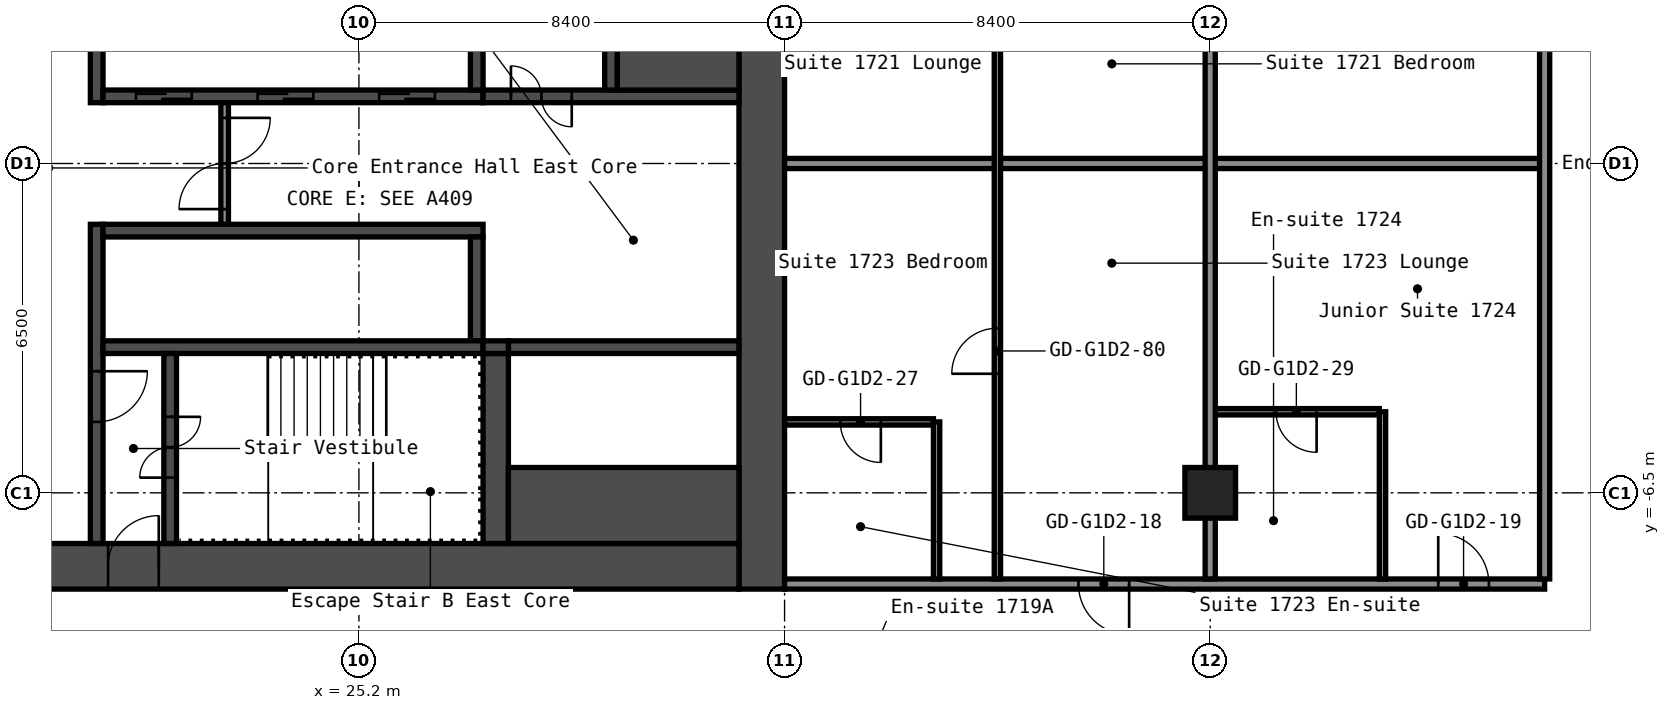
"""IFC4 building model, lengths in metres.
Left out: names, types, materials, properties, quantities, classifications, styles, units other than length and angle.
Written with IfcOpenShell. Run it as: python <this file> out.ifc"""

import sys

from ifc_helpers import new_model, si_unit, direction, frame, frame_2d, origin, origin_2d, place, context, subcontext, project, spatial, rectangle, hollow_rectangle, extrude, element, fill, save


model = new_model("IFC4")
c1 = context("Model", 3, precision=1e-05, world=origin(), true_north=direction((0.0, 1.0)))
c2 = subcontext(c1, "Body", "Model", "MODEL_VIEW")
j1 = project(units=[si_unit("LENGTHUNIT", "METRE"), si_unit("PLANEANGLEUNIT", "RADIAN")], contexts=[c1])
p1 = place(None, origin())
s1 = spatial("IfcSite", under=j1, at=p1, CompositionType="ELEMENT")
p2 = place(p1, origin())
s2 = spatial("IfcBuilding", under=s1, at=p2, CompositionType="ELEMENT")
p3 = place(p2, frame((0.0, 0.0, 61.4)))
s3 = spatial("IfcBuildingStorey", under=s2, at=p3, CompositionType="ELEMENT", Elevation=61.4)
p4 = place(p3, frame((42.0, -6.5, 0.0), z_axis=(0.0, 0.0, 1.0), x_axis=(1.0, 0.0, 0.0)))
e1 = element("IfcColumn", 1, at=p4, inside=s3, PredefinedType="COLUMN", context=c2, shape_type="SweptSolid", body=[
    extrude(hollow_rectangle(XDim=1.0, YDim=1.0, WallThickness=0.04, at=origin_2d()), origin(), (0.0, 0.0, 1.0), 2.9),
])
p5 = place(p3, frame((33.15, -8.4, 0.0), z_axis=(0.0, 0.0, 1.0), x_axis=(0.0, 1.0, 0.0)))
e2 = element("IfcWall", 2, at=p5, inside=s3, PredefinedType="SHEAR", context=c2, shape_type="SweptSolid", body=[
    extrude(rectangle(XDim=16.8, YDim=0.9, at=frame_2d((8.4, 0.0))), origin(), (0.0, 0.0, 1.0), 2.9),
])
p6 = place(p3, frame((17.7, -7.95, 0.0), z_axis=(0.0, 0.0, 1.0), x_axis=(1.0, 0.0, 0.0)))
e3 = element("IfcWall", 3, at=p6, inside=s3, PredefinedType="SHEAR", context=c2, shape_type="SweptSolid", body=[
    extrude(rectangle(XDim=15.0, YDim=0.9, at=frame_2d((7.5, 0.0))), origin(), (0.0, 0.0, 1.0), 2.9),
])
p7 = place(p6, frame((2.55, 0.0, 0.0)))
e4 = element("IfcOpeningElement", 4, at=p7, cuts=e3, PredefinedType="OPENING", context=c2, shape_type="SweptSolid", body=[
    extrude(rectangle(XDim=1.0, YDim=2.1, at=frame_2d((0.5, 1.05))), frame((0.0, 0.46, 0.0), z_axis=(0.0, -1.0, 0.0), x_axis=(1.0, 0.0, 0.0)), (0.0, 0.0, 1.0), 0.92),
])
p8 = place(p3, frame((20.025, 1.2, 0.0), z_axis=(0.0, 0.0, 1.0), x_axis=(0.0, 1.0, 0.0)))
e5 = element("IfcWall", 5, at=p8, inside=s3, PredefinedType="SHEAR", context=c2, shape_type="SweptSolid", body=[
    extrude(rectangle(XDim=6.3, YDim=0.25, at=frame_2d((3.15, 0.0))), origin(), (0.0, 0.0, 1.0), 2.9),
])
p9 = place(p3, frame((20.025, -7.5, 0.0), z_axis=(0.0, 0.0, 1.0), x_axis=(0.0, 1.0, 0.0)))
e6 = element("IfcWall", 6, at=p9, inside=s3, PredefinedType="SHEAR", context=c2, shape_type="SweptSolid", body=[
    extrude(rectangle(XDim=6.3, YDim=0.25, at=frame_2d((3.15, 0.0))), origin(), (0.0, 0.0, 1.0), 2.9),
])
p10 = place(p9, frame((2.4, 0.0, 0.0)))
e7 = element("IfcOpeningElement", 7, at=p10, cuts=e6, PredefinedType="OPENING", context=c2, shape_type="SweptSolid", body=[
    extrude(rectangle(XDim=1.0, YDim=2.1, at=frame_2d((0.5, 1.05))), frame((0.0, 0.135, 0.0), z_axis=(0.0, -1.0, 0.0), x_axis=(1.0, 0.0, 0.0)), (0.0, 0.0, 1.0), 0.27),
])
p11 = place(p3, frame((20.15, 1.325, 0.0), z_axis=(0.0, 0.0, 1.0), x_axis=(1.0, 0.0, 0.0)))
e8 = element("IfcWall", 8, at=p11, inside=s3, PredefinedType="SHEAR", context=c2, shape_type="SweptSolid", body=[
    extrude(rectangle(XDim=7.5, YDim=0.25, at=frame_2d((3.75, 0.0))), origin(), (0.0, 0.0, 1.0), 2.9),
])
p12 = place(p11, frame((0.65, 0.0, 0.0)))
e9 = element("IfcOpeningElement", 9, at=p12, cuts=e8, PredefinedType="OPENING", context=c2, shape_type="SweptSolid", body=[
    extrude(rectangle(XDim=1.1, YDim=2.1, at=frame_2d((0.55, 1.05))), frame((0.0, 0.135, 0.0), z_axis=(0.0, -1.0, 0.0), x_axis=(1.0, 0.0, 0.0)), (0.0, 0.0, 1.0), 0.27),
])
p13 = place(p11, frame((3.05, 0.0, 0.0)))
e10 = element("IfcOpeningElement", 10, at=p13, cuts=e8, PredefinedType="OPENING", context=c2, shape_type="SweptSolid", body=[
    extrude(rectangle(XDim=1.1, YDim=2.1, at=frame_2d((0.55, 1.05))), frame((0.0, 0.135, 0.0), z_axis=(0.0, -1.0, 0.0), x_axis=(1.0, 0.0, 0.0)), (0.0, 0.0, 1.0), 0.27),
])
p14 = place(p11, frame((5.45, 0.0, 0.0)))
e11 = element("IfcOpeningElement", 11, at=p14, cuts=e8, PredefinedType="OPENING", context=c2, shape_type="SweptSolid", body=[
    extrude(rectangle(XDim=1.1, YDim=2.1, at=frame_2d((0.55, 1.05))), frame((0.0, 0.135, 0.0), z_axis=(0.0, -1.0, 0.0), x_axis=(1.0, 0.0, 0.0)), (0.0, 0.0, 1.0), 0.27),
])
p15 = place(p3, frame((27.525, 1.45, 0.0), z_axis=(0.0, 0.0, 1.0), x_axis=(0.0, 1.0, 0.0)))
e12 = element("IfcWall", 12, at=p15, inside=s3, PredefinedType="SHEAR", context=c2, shape_type="SweptSolid", body=[
    extrude(rectangle(XDim=2.05, YDim=0.25, at=frame_2d((1.025, 0.0))), origin(), (0.0, 0.0, 1.0), 2.9),
])
p16 = place(p3, frame((27.65, 1.325, 0.0), z_axis=(0.0, 0.0, 1.0), x_axis=(1.0, 0.0, 0.0)))
e13 = element("IfcWall", 13, at=p16, inside=s3, PredefinedType="SHEAR", context=c2, shape_type="SweptSolid", body=[
    extrude(rectangle(XDim=5.05, YDim=0.25, at=frame_2d((2.525, 0.0))), origin(), (0.0, 0.0, 1.0), 2.9),
])
p17 = place(p16, frame((0.55, 0.0, 0.0)))
e14 = element("IfcOpeningElement", 14, at=p17, cuts=e13, PredefinedType="OPENING", context=c2, shape_type="SweptSolid", body=[
    extrude(rectangle(XDim=1.2, YDim=2.1, at=frame_2d((0.6, 1.05))), frame((0.0, 0.135, 0.0), z_axis=(0.0, -1.0, 0.0), x_axis=(1.0, 0.0, 0.0)), (0.0, 0.0, 1.0), 0.27),
])
p18 = place(p3, frame((30.175, 1.45, 0.0), z_axis=(0.0, 0.0, 1.0), x_axis=(0.0, 1.0, 0.0)))
e15 = element("IfcWall", 15, at=p18, inside=s3, PredefinedType="SHEAR", context=c2, shape_type="SweptSolid", body=[
    extrude(rectangle(XDim=6.05, YDim=0.25, at=frame_2d((3.025, 0.0))), origin(), (0.0, 0.0, 1.0), 2.9),
])
p19 = place(p18, frame((2.625, 0.0, 0.0)))
e16 = element("IfcOpeningElement", 16, at=p19, cuts=e15, PredefinedType="OPENING", context=c2, shape_type="SweptSolid", body=[
    extrude(rectangle(XDim=1.1, YDim=2.1, at=frame_2d((0.55, 1.05))), frame((0.0, 0.135, 0.0), z_axis=(0.0, -1.0, 0.0), x_axis=(1.0, 0.0, 0.0)), (0.0, 0.0, 1.0), 0.27),
])
p20 = place(p3, frame((30.3, 2.375, 0.0), z_axis=(0.0, 0.0, 1.0), x_axis=(1.0, 0.0, 0.0)))
e17 = element("IfcWall", 17, at=p20, inside=s3, PredefinedType="SHEAR", context=c2, shape_type="SweptSolid", body=[
    extrude(rectangle(XDim=2.4, YDim=1.85, at=frame_2d((1.2, 0.0))), origin(), (0.0, 0.0, 1.0), 2.9),
])
p21 = place(p3, frame((20.15, -1.325, 0.0), z_axis=(0.0, 0.0, 1.0), x_axis=(1.0, 0.0, 0.0)))
e18 = element("IfcWall", 18, at=p21, inside=s3, PredefinedType="SHEAR", context=c2, shape_type="SweptSolid", body=[
    extrude(rectangle(XDim=7.5, YDim=0.25, at=frame_2d((3.75, 0.0))), origin(), (0.0, 0.0, 1.0), 2.9),
])
p22 = place(p3, frame((27.525, -3.5, 0.0), z_axis=(0.0, 0.0, 1.0), x_axis=(0.0, 1.0, 0.0)))
e19 = element("IfcWall", 19, at=p22, inside=s3, PredefinedType="SHEAR", context=c2, shape_type="SweptSolid", body=[
    extrude(rectangle(XDim=2.05, YDim=0.25, at=frame_2d((1.025, 0.0))), origin(), (0.0, 0.0, 1.0), 2.9),
])
p23 = place(p3, frame((20.15, -3.625, 0.0), z_axis=(0.0, 0.0, 1.0), x_axis=(1.0, 0.0, 0.0)))
e20 = element("IfcWall", 20, at=p23, inside=s3, PredefinedType="SHEAR", context=c2, shape_type="SweptSolid", body=[
    extrude(rectangle(XDim=7.5, YDim=0.25, at=frame_2d((3.75, 0.0))), origin(), (0.0, 0.0, 1.0), 2.9),
])
p24 = place(p3, frame((21.475, -7.5, 0.0), z_axis=(0.0, 0.0, 1.0), x_axis=(0.0, 1.0, 0.0)))
e21 = element("IfcWall", 21, at=p24, inside=s3, PredefinedType="SHEAR", context=c2, shape_type="SweptSolid", body=[
    extrude(rectangle(XDim=3.75, YDim=0.25, at=frame_2d((1.875, 0.0))), origin(), (0.0, 0.0, 1.0), 2.9),
])
p25 = place(p24, frame((1.3, 0.0, 0.0)))
e22 = element("IfcOpeningElement", 22, at=p25, cuts=e21, PredefinedType="OPENING", context=c2, shape_type="SweptSolid", body=[
    extrude(rectangle(XDim=1.2, YDim=2.1, at=frame_2d((0.6, 1.05))), frame((0.0, 0.135, 0.0), z_axis=(0.0, -1.0, 0.0), x_axis=(1.0, 0.0, 0.0)), (0.0, 0.0, 1.0), 0.27),
])
p26 = place(p3, frame((27.9, -7.5, 0.0), z_axis=(0.0, 0.0, 1.0), x_axis=(0.0, 1.0, 0.0)))
e23 = element("IfcWall", 23, at=p26, inside=s3, PredefinedType="SHEAR", context=c2, shape_type="SweptSolid", body=[
    extrude(rectangle(XDim=3.75, YDim=0.5, at=frame_2d((1.875, 0.0))), origin(), (0.0, 0.0, 1.0), 2.9),
])
p27 = place(p3, frame((28.15, -3.625, 0.0), z_axis=(0.0, 0.0, 1.0), x_axis=(1.0, 0.0, 0.0)))
e24 = element("IfcWall", 24, at=p27, inside=s3, PredefinedType="SHEAR", context=c2, shape_type="SweptSolid", body=[
    extrude(rectangle(XDim=4.55, YDim=0.25, at=frame_2d((2.275, 0.0))), origin(), (0.0, 0.0, 1.0), 2.9),
])
p28 = place(p3, frame((28.15, -6.75, 0.0), z_axis=(0.0, 0.0, 1.0), x_axis=(1.0, 0.0, 0.0)))
e25 = element("IfcWall", 25, at=p28, inside=s3, PredefinedType="SHEAR", context=c2, shape_type="SweptSolid", body=[
    extrude(rectangle(XDim=4.55, YDim=1.5, at=frame_2d((2.275, 0.0))), origin(), (0.0, 0.0, 1.0), 2.9),
])
p29 = place(p3, frame((27.65, -3.625, 0.0), z_axis=(0.0, 0.0, 1.0), x_axis=(1.0, 0.0, 0.0)))
e26 = element("IfcWall", 26, at=p29, inside=s3, PredefinedType="SHEAR", context=c2, shape_type="SweptSolid", body=[
    extrude(rectangle(XDim=0.5, YDim=0.25, at=frame_2d((0.25, 0.0))), origin(), (0.0, 0.0, 1.0), 2.9),
])
p30 = place(p3, frame((22.55, -1.2, 0.0), z_axis=(0.0, 0.0, 1.0), x_axis=(0.0, 1.0, 0.0)))
e27 = element("IfcWall", 27, at=p30, inside=s3, PredefinedType="PARTITIONING", context=c2, shape_type="SweptSolid", body=[
    extrude(rectangle(XDim=2.4, YDim=0.15, at=frame_2d((1.2, 0.0))), origin(), (0.0, 0.0, 1.0), 2.9),
])
p31 = place(p30, frame((0.3, 0.0, 0.0)))
e28 = element("IfcOpeningElement", 28, at=p31, cuts=e27, PredefinedType="OPENING", context=c2, shape_type="SweptSolid", body=[
    extrude(rectangle(XDim=1.8, YDim=2.1, at=frame_2d((0.9, 1.05))), frame((0.0, 0.085, 0.0), z_axis=(0.0, -1.0, 0.0), x_axis=(1.0, 0.0, 0.0)), (0.0, 0.0, 1.0), 0.17),
])
p32 = place(p3, frame((33.6, -8.3, 0.0), z_axis=(0.0, 0.0, 1.0), x_axis=(1.0, 0.0, 0.0)))
e29 = element("IfcWall", 29, at=p32, inside=s3, PredefinedType="PARTITIONING", context=c2, shape_type="SweptSolid", body=[
    extrude(rectangle(XDim=15.0, YDim=0.2, at=frame_2d((7.5, 0.0))), origin(), (0.0, 0.0, 1.0), 2.9),
])
p33 = place(p32, frame((5.8, 0.0, 0.0)))
e30 = element("IfcOpeningElement", 30, at=p33, cuts=e29, PredefinedType="OPENING", context=c2, shape_type="SweptSolid", body=[
    extrude(rectangle(XDim=1.0, YDim=2.1, at=frame_2d((0.5, 1.05))), frame((0.0, 0.11, 0.0), z_axis=(0.0, -1.0, 0.0), x_axis=(1.0, 0.0, 0.0)), (0.0, 0.0, 1.0), 0.22),
])
p34 = place(p32, frame((12.9, 0.0, 0.0)))
e31 = element("IfcOpeningElement", 31, at=p34, cuts=e29, PredefinedType="OPENING", context=c2, shape_type="SweptSolid", body=[
    extrude(rectangle(XDim=1.0, YDim=2.1, at=frame_2d((0.5, 1.05))), frame((0.0, 0.11, 0.0), z_axis=(0.0, -1.0, 0.0), x_axis=(1.0, 0.0, 0.0)), (0.0, 0.0, 1.0), 0.22),
])
p35 = place(p3, frame((33.6, -5.1, 0.0), z_axis=(0.0, 0.0, 1.0), x_axis=(1.0, 0.0, 0.0)))
e32 = element("IfcWall", 32, at=p35, inside=s3, PredefinedType="PARTITIONING", context=c2, shape_type="SweptSolid", body=[
    extrude(rectangle(XDim=2.938, YDim=0.125, at=frame_2d((1.469, 0.0))), origin(), (0.0, 0.0, 1.0), 2.9),
])
p36 = place(p35, frame((1.1, 0.0, 0.0)))
e33 = element("IfcOpeningElement", 33, at=p36, cuts=e32, PredefinedType="OPENING", context=c2, shape_type="SweptSolid", body=[
    extrude(rectangle(XDim=0.8, YDim=2.1, at=frame_2d((0.4, 1.05))), frame((0.0, 0.073, 0.0), z_axis=(0.0, -1.0, 0.0), x_axis=(1.0, 0.0, 0.0)), (0.0, 0.0, 1.0), 0.145),
])
p37 = place(p3, frame((42.1, -4.9, 0.0), z_axis=(0.0, 0.0, 1.0), x_axis=(1.0, 0.0, 0.0)))
e34 = element("IfcWall", 34, at=p37, inside=s3, PredefinedType="PARTITIONING", context=c2, shape_type="SweptSolid", body=[
    extrude(rectangle(XDim=3.237, YDim=0.125, at=frame_2d((1.619, 0.0))), origin(), (0.0, 0.0, 1.0), 2.9),
])
p38 = place(p37, frame((1.2, 0.0, 0.0)))
e35 = element("IfcOpeningElement", 35, at=p38, cuts=e34, PredefinedType="OPENING", context=c2, shape_type="SweptSolid", body=[
    extrude(rectangle(XDim=0.8, YDim=2.1, at=frame_2d((0.4, 1.05))), frame((0.0, 0.073, 0.0), z_axis=(0.0, -1.0, 0.0), x_axis=(1.0, 0.0, 0.0)), (0.0, 0.0, 1.0), 0.145),
])
p39 = place(p3, frame((33.6, 0.0, 0.0), z_axis=(0.0, 0.0, 1.0), x_axis=(1.0, 0.0, 0.0)))
e36 = element("IfcWall", 36, at=p39, inside=s3, PredefinedType="PARTITIONING", context=c2, shape_type="SweptSolid", body=[
    extrude(rectangle(XDim=14.9, YDim=0.2, at=frame_2d((7.45, 0.0))), origin(), (0.0, 0.0, 1.0), 2.9),
])
p40 = place(p3, frame((36.6, -8.2, 0.0), z_axis=(0.0, 0.0, 1.0), x_axis=(0.0, 1.0, 0.0)))
e37 = element("IfcWall", 37, at=p40, inside=s3, PredefinedType="PARTITIONING", context=c2, shape_type="SweptSolid", body=[
    extrude(rectangle(XDim=3.1, YDim=0.125, at=frame_2d((1.55, 0.0))), origin(), (0.0, 0.0, 1.0), 2.9),
])
p41 = place(p3, frame((37.8, -8.2, 0.0), z_axis=(0.0, 0.0, 1.0), x_axis=(0.0, 1.0, 0.0)))
e38 = element("IfcWall", 38, at=p41, inside=s3, PredefinedType="PARTITIONING", context=c2, shape_type="SweptSolid", body=[
    extrude(rectangle(XDim=16.4, YDim=0.125, at=frame_2d((8.2, 0.0))), origin(), (0.0, 0.0, 1.0), 2.9),
])
p42 = place(p41, frame((4.05, 0.0, 0.0)))
e39 = element("IfcOpeningElement", 39, at=p42, cuts=e38, PredefinedType="OPENING", context=c2, shape_type="SweptSolid", body=[
    extrude(rectangle(XDim=0.9, YDim=2.1, at=frame_2d((0.45, 1.05))), frame((0.0, 0.073, 0.0), z_axis=(0.0, -1.0, 0.0), x_axis=(1.0, 0.0, 0.0)), (0.0, 0.0, 1.0), 0.145),
])
p43 = place(p41, frame((11.45, 0.0, 0.0)))
e40 = element("IfcOpeningElement", 40, at=p43, cuts=e38, PredefinedType="OPENING", context=c2, shape_type="SweptSolid", body=[
    extrude(rectangle(XDim=0.9, YDim=2.1, at=frame_2d((0.45, 1.05))), frame((0.0, 0.073, 0.0), z_axis=(0.0, -1.0, 0.0), x_axis=(1.0, 0.0, 0.0)), (0.0, 0.0, 1.0), 0.145),
])
p44 = place(p3, frame((42.0, -8.2, 0.0), z_axis=(0.0, 0.0, 1.0), x_axis=(0.0, 1.0, 0.0)))
e41 = element("IfcWall", 41, at=p44, inside=s3, PredefinedType="PARTITIONING", context=c2, shape_type="SweptSolid", body=[
    extrude(rectangle(XDim=16.4, YDim=0.2, at=frame_2d((8.2, 0.0))), origin(), (0.0, 0.0, 1.0), 2.9),
])
p45 = place(p3, frame((45.4, -8.2, 0.0), z_axis=(0.0, 0.0, 1.0), x_axis=(0.0, 1.0, 0.0)))
e42 = element("IfcWall", 42, at=p45, inside=s3, PredefinedType="PARTITIONING", context=c2, shape_type="SweptSolid", body=[
    extrude(rectangle(XDim=3.3, YDim=0.125, at=frame_2d((1.65, 0.0))), origin(), (0.0, 0.0, 1.0), 2.9),
])
p46 = place(p3, frame((48.6, -8.2, 0.0), z_axis=(0.0, 0.0, 1.0), x_axis=(0.0, 1.0, 0.0)))
e43 = element("IfcWall", 43, at=p46, inside=s3, PredefinedType="PARTITIONING", context=c2, shape_type="SweptSolid", body=[
    extrude(rectangle(XDim=16.4, YDim=0.2, at=frame_2d((8.2, 0.0))), origin(), (0.0, 0.0, 1.0), 2.9),
])
p47 = place(p7, origin())
e44 = element("IfcDoor", 44, at=p47, inside=s3, OperationType="SINGLE_SWING_LEFT", PredefinedType="DOOR", context=c2, shape_type="SweptSolid", body=[
    extrude(rectangle(XDim=1.0, YDim=2.1, at=frame_2d((0.5, 1.05))), frame((0.0, 0.025, 0.0), z_axis=(0.0, -1.0, 0.0), x_axis=(1.0, 0.0, 0.0)), (0.0, 0.0, 1.0), 0.05),
])
fill(e4, e44)
p48 = place(p25, origin())
e45 = element("IfcDoor", 45, at=p48, inside=s3, OperationType="DOUBLE_DOOR_SINGLE_SWING", PredefinedType="DOOR", context=c2, shape_type="SweptSolid", body=[
    extrude(rectangle(XDim=1.2, YDim=2.1, at=frame_2d((0.6, 1.05))), frame((0.0, 0.025, 0.0), z_axis=(0.0, -1.0, 0.0), x_axis=(1.0, 0.0, 0.0)), (0.0, 0.0, 1.0), 0.05),
])
fill(e22, e45)
p49 = place(p10, origin())
e46 = element("IfcDoor", 46, at=p49, inside=s3, OperationType="SINGLE_SWING_RIGHT", PredefinedType="DOOR", context=c2, shape_type="SweptSolid", body=[
    extrude(rectangle(XDim=1.0, YDim=2.1, at=frame_2d((0.5, 1.05))), frame((0.0, 0.025, 0.0), z_axis=(0.0, -1.0, 0.0), x_axis=(1.0, 0.0, 0.0)), (0.0, 0.0, 1.0), 0.05),
])
fill(e7, e46)
p50 = place(p17, origin())
e47 = element("IfcDoor", 47, at=p50, inside=s3, OperationType="DOUBLE_DOOR_SINGLE_SWING", PredefinedType="DOOR", context=c2, shape_type="SweptSolid", body=[
    extrude(rectangle(XDim=1.2, YDim=2.1, at=frame_2d((0.6, 1.05))), frame((0.0, 0.025, 0.0), z_axis=(0.0, -1.0, 0.0), x_axis=(1.0, 0.0, 0.0)), (0.0, 0.0, 1.0), 0.05),
])
fill(e14, e47)
p51 = place(p31, origin())
e48 = element("IfcDoor", 48, at=p51, inside=s3, OperationType="DOUBLE_DOOR_SINGLE_SWING", PredefinedType="DOOR", context=c2, shape_type="SweptSolid", body=[
    extrude(rectangle(XDim=1.8, YDim=2.1, at=frame_2d((0.9, 1.05))), frame((0.0, 0.025, 0.0), z_axis=(0.0, -1.0, 0.0), x_axis=(1.0, 0.0, 0.0)), (0.0, 0.0, 1.0), 0.05),
])
fill(e28, e48)
p52 = place(p12, origin())
e49 = element("IfcDoor", 49, at=p52, inside=s3, OperationType="DOUBLE_DOOR_SLIDING", PredefinedType="DOOR", context=c2, shape_type="SweptSolid", body=[
    extrude(rectangle(XDim=1.1, YDim=2.1, at=frame_2d((0.55, 1.05))), frame((0.0, 0.025, 0.0), z_axis=(0.0, -1.0, 0.0), x_axis=(1.0, 0.0, 0.0)), (0.0, 0.0, 1.0), 0.05),
])
fill(e9, e49)
p53 = place(p13, origin())
e50 = element("IfcDoor", 50, at=p53, inside=s3, OperationType="DOUBLE_DOOR_SLIDING", PredefinedType="DOOR", context=c2, shape_type="SweptSolid", body=[
    extrude(rectangle(XDim=1.1, YDim=2.1, at=frame_2d((0.55, 1.05))), frame((0.0, 0.025, 0.0), z_axis=(0.0, -1.0, 0.0), x_axis=(1.0, 0.0, 0.0)), (0.0, 0.0, 1.0), 0.05),
])
fill(e10, e50)
p54 = place(p14, origin())
e51 = element("IfcDoor", 51, at=p54, inside=s3, OperationType="DOUBLE_DOOR_SLIDING", PredefinedType="DOOR", context=c2, shape_type="SweptSolid", body=[
    extrude(rectangle(XDim=1.1, YDim=2.1, at=frame_2d((0.55, 1.05))), frame((0.0, 0.025, 0.0), z_axis=(0.0, -1.0, 0.0), x_axis=(1.0, 0.0, 0.0)), (0.0, 0.0, 1.0), 0.05),
])
fill(e11, e51)
p55 = place(p33, origin())
e52 = element("IfcDoor", 52, at=p55, inside=s3, OperationType="SINGLE_SWING_RIGHT", PredefinedType="DOOR", context=c2, shape_type="SweptSolid", body=[
    extrude(rectangle(XDim=1.0, YDim=2.1, at=frame_2d((0.5, 1.05))), frame((0.0, 0.025, 0.0), z_axis=(0.0, -1.0, 0.0), x_axis=(1.0, 0.0, 0.0)), (0.0, 0.0, 1.0), 0.05),
])
fill(e30, e52)
p56 = place(p34, origin())
e53 = element("IfcDoor", 53, at=p56, inside=s3, OperationType="SINGLE_SWING_RIGHT", PredefinedType="DOOR", context=c2, shape_type="SweptSolid", body=[
    extrude(rectangle(XDim=1.0, YDim=2.1, at=frame_2d((0.5, 1.05))), frame((0.0, 0.025, 0.0), z_axis=(0.0, -1.0, 0.0), x_axis=(1.0, 0.0, 0.0)), (0.0, 0.0, 1.0), 0.05),
])
fill(e31, e53)
p57 = place(p36, origin())
e54 = element("IfcDoor", 54, at=p57, inside=s3, OperationType="SINGLE_SWING_RIGHT", PredefinedType="DOOR", context=c2, shape_type="SweptSolid", body=[
    extrude(rectangle(XDim=0.8, YDim=2.1, at=frame_2d((0.4, 1.05))), frame((0.0, 0.025, 0.0), z_axis=(0.0, -1.0, 0.0), x_axis=(1.0, 0.0, 0.0)), (0.0, 0.0, 1.0), 0.05),
])
fill(e33, e54)
p58 = place(p38, origin())
e55 = element("IfcDoor", 55, at=p58, inside=s3, OperationType="SINGLE_SWING_RIGHT", PredefinedType="DOOR", context=c2, shape_type="SweptSolid", body=[
    extrude(rectangle(XDim=0.8, YDim=2.1, at=frame_2d((0.4, 1.05))), frame((0.0, 0.025, 0.0), z_axis=(0.0, -1.0, 0.0), x_axis=(1.0, 0.0, 0.0)), (0.0, 0.0, 1.0), 0.05),
])
fill(e35, e55)
p59 = place(p42, origin())
e56 = element("IfcDoor", 56, at=p59, inside=s3, OperationType="SINGLE_SWING_RIGHT", PredefinedType="DOOR", context=c2, shape_type="SweptSolid", body=[
    extrude(rectangle(XDim=0.9, YDim=2.1, at=frame_2d((0.45, 1.05))), frame((0.0, 0.025, 0.0), z_axis=(0.0, -1.0, 0.0), x_axis=(1.0, 0.0, 0.0)), (0.0, 0.0, 1.0), 0.05),
])
fill(e39, e56)
save(model, sys.argv[1])
